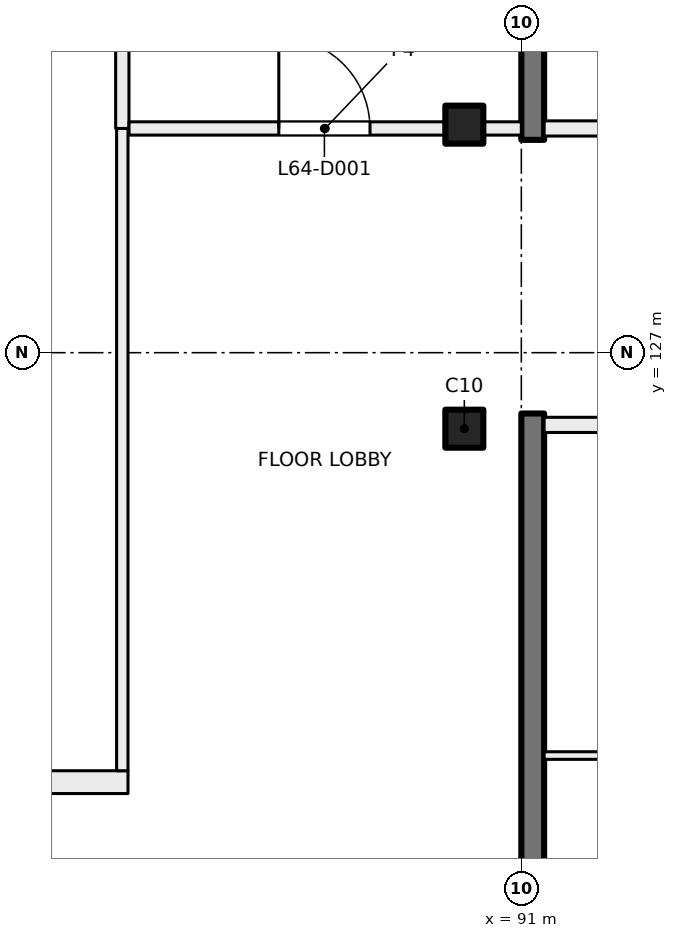
"""IFC4 building model, lengths in metres.
Left out: names, types, materials, properties, quantities, classifications, styles, units other than length and angle.
Written with IfcOpenShell. Run it as: python <this file> out.ifc"""

import sys

from ifc_helpers import new_model, si_unit, direction, frame, frame_2d, origin, origin_2d, place, context, subcontext, project, spatial, rectangle, extrude, element, fill, save


model = new_model("IFC4")
c1 = context("Model", 3, precision=1e-05, world=origin(), true_north=direction((0.0, 1.0)))
c2 = subcontext(c1, "Body", "Model", "MODEL_VIEW")
j1 = project(units=[si_unit("LENGTHUNIT", "METRE"), si_unit("PLANEANGLEUNIT", "RADIAN")], contexts=[c1])
p1 = place(None, origin())
s1 = spatial("IfcSite", under=j1, at=p1, CompositionType="ELEMENT")
p2 = place(p1, origin())
s2 = spatial("IfcBuilding", under=s1, at=p2, CompositionType="ELEMENT")
p3 = place(p2, frame((0.0, 0.0, 269.5)))
s3 = spatial("IfcBuildingStorey", under=s2, at=p3, CompositionType="ELEMENT", Elevation=269.5)
for number, where, z_axis, x_axis in (
    (1, (90.25, 130.0, 0.0), (0.0, 0.0, 1.0), (1.0, 0.0, 0.0)),
    (2, (90.25, 126.0, 0.0), (0.0, 0.0, 1.0), (1.0, 0.0, 0.0)),
):
    element("IfcColumn", number, at=place(p3, frame(where, z_axis=z_axis, x_axis=x_axis)), inside=s3, PredefinedType="COLUMN", context=c2, shape_type="SweptSolid", body=[
        extrude(rectangle(XDim=0.5, YDim=0.5, at=origin_2d()), origin(), (0.0, 0.0, 1.0), 4.0),
    ])
for number, where, z_axis, x_axis in (
    (3, (91.15, 138.55, 0.0), (0.0, 0.0, 1.0), (0.0, -1.0, 0.0)),
    (4, (91.15, 126.2, 0.0), (0.0, 0.0, 1.0), (0.0, -1.0, 0.0)),
):
    element("IfcWall", number, at=place(p3, frame(where, z_axis=z_axis, x_axis=x_axis)), inside=s3, PredefinedType="SHEAR", context=c2, shape_type="SweptSolid", body=[
        extrude(rectangle(XDim=8.75, YDim=0.3, at=frame_2d((4.375, 0.0))), origin(), (0.0, 0.0, 1.0), 4.0),
    ])
p4 = place(p3, frame((95.25, 126.05, 0.0), z_axis=(0.0, 0.0, 1.0), x_axis=(-1.0, 0.0, 0.0)))
e5 = element("IfcWall", 5, at=p4, inside=s3, PredefinedType="PARTITIONING", context=c2, shape_type="SweptSolid", body=[
    extrude(rectangle(XDim=3.95, YDim=0.2, at=frame_2d((1.975, 0.0))), origin(), (0.0, 0.0, 1.0), 3.625),
])
p5 = place(p4, frame((0.3, 0.0, 0.0)))
e6 = element("IfcOpeningElement", 6, at=p5, cuts=e5, PredefinedType="OPENING", context=c2, shape_type="SweptSolid", body=[
    extrude(rectangle(XDim=1.2, YDim=2.1, at=frame_2d((0.6, 1.05))), frame((0.0, 0.11, 0.0), z_axis=(0.0, -1.0, 0.0), x_axis=(1.0, 0.0, 0.0)), (0.0, 0.0, 1.0), 0.22),
])
p6 = place(p3, frame((93.4, 121.7, 0.0), z_axis=(0.0, 0.0, 1.0), x_axis=(-1.0, 0.0, 0.0)))
e7 = element("IfcWall", 7, at=p6, inside=s3, PredefinedType="PARTITIONING", context=c2, shape_type="SweptSolid", body=[
    extrude(rectangle(XDim=2.1, YDim=0.1, at=frame_2d((1.05, 0.0))), origin(), (0.0, 0.0, 1.0), 3.625),
])
p7 = place(p3, frame((91.3, 129.95, 0.0), z_axis=(0.0, 0.0, 1.0), x_axis=(1.0, 0.0, 0.0)))
e8 = element("IfcWall", 8, at=p7, inside=s3, PredefinedType="PARTITIONING", context=c2, shape_type="SweptSolid", body=[
    extrude(rectangle(XDim=3.95, YDim=0.2, at=frame_2d((1.975, 0.0))), origin(), (0.0, 0.0, 1.0), 3.625),
])
p8 = place(p7, frame((2.45, 0.0, 0.0)))
e9 = element("IfcOpeningElement", 9, at=p8, cuts=e8, PredefinedType="OPENING", context=c2, shape_type="SweptSolid", body=[
    extrude(rectangle(XDim=1.2, YDim=2.1, at=frame_2d((0.6, 1.05))), frame((0.0, 0.11, 0.0), z_axis=(0.0, -1.0, 0.0), x_axis=(1.0, 0.0, 0.0)), (0.0, 0.0, 1.0), 0.22),
])
p9 = place(p3, frame((54.4, 121.35, 0.0), z_axis=(0.0, 0.0, 1.0), x_axis=(1.0, 0.0, 0.0)))
e10 = element("IfcWall", 10, at=p9, inside=s3, PredefinedType="PARTITIONING", context=c2, shape_type="SweptSolid", body=[
    extrude(rectangle(XDim=31.425, YDim=0.3, at=frame_2d((15.712, 0.0))), origin(), (0.0, 0.0, 1.0), 3.625),
])
p10 = place(p9, frame((18.95, 0.0, 0.0)))
e11 = element("IfcOpeningElement", 11, at=p10, cuts=e10, PredefinedType="OPENING", context=c2, shape_type="SweptSolid", body=[
    extrude(rectangle(XDim=0.8, YDim=2.1, at=frame_2d((0.4, 1.05))), frame((0.0, 0.16, 0.0), z_axis=(0.0, -1.0, 0.0), x_axis=(1.0, 0.0, 0.0)), (0.0, 0.0, 1.0), 0.32),
])
p11 = place(p9, frame((25.2, 0.0, 0.0)))
e12 = element("IfcOpeningElement", 12, at=p11, cuts=e10, PredefinedType="OPENING", context=c2, shape_type="SweptSolid", body=[
    extrude(rectangle(XDim=1.8, YDim=2.1, at=frame_2d((0.9, 1.05))), frame((0.0, 0.16, 0.0), z_axis=(0.0, -1.0, 0.0), x_axis=(1.0, 0.0, 0.0)), (0.0, 0.0, 1.0), 0.32),
])
p12 = place(p9, frame((12.85, 0.0, 0.0)))
e13 = element("IfcOpeningElement", 13, at=p12, cuts=e10, PredefinedType="OPENING", context=c2, shape_type="SweptSolid", body=[
    extrude(rectangle(XDim=1.0, YDim=2.1, at=frame_2d((0.5, 1.05))), frame((0.0, 0.16, 0.0), z_axis=(0.0, -1.0, 0.0), x_axis=(1.0, 0.0, 0.0)), (0.0, 0.0, 1.0), 0.32),
])
p13 = place(p9, frame((3.515, 0.0, 0.0)))
e14 = element("IfcOpeningElement", 14, at=p13, cuts=e10, PredefinedType="OPENING", context=c2, shape_type="SweptSolid", body=[
    extrude(rectangle(XDim=1.8, YDim=2.1, at=frame_2d((0.9, 1.05))), frame((0.0, 0.16, 0.0), z_axis=(0.0, -1.0, 0.0), x_axis=(1.0, 0.0, 0.0)), (0.0, 0.0, 1.0), 0.32),
])
p14 = place(p3, frame((85.75, 121.5, 0.0), z_axis=(0.0, 0.0, 1.0), x_axis=(0.0, 1.0, 0.0)))
e15 = element("IfcWall", 15, at=p14, inside=s3, PredefinedType="PARTITIONING", context=c2, shape_type="SweptSolid", body=[
    extrude(rectangle(XDim=8.45, YDim=0.15, at=frame_2d((4.225, 0.0))), origin(), (0.0, 0.0, 1.0), 3.625),
])
p15 = place(p3, frame((85.75, 129.95, 0.0), z_axis=(0.0, 0.0, 1.0), x_axis=(0.0, 1.0, 0.0)))
e16 = element("IfcWall", 16, at=p15, inside=s3, PredefinedType="PARTITIONING", context=c2, shape_type="SweptSolid", body=[
    extrude(rectangle(XDim=8.45, YDim=0.175, at=frame_2d((4.225, 0.0))), origin(), (0.0, 0.0, 1.0), 3.625),
])
p16 = place(p3, frame((85.838, 129.95, 0.0), z_axis=(0.0, 0.0, 1.0), x_axis=(1.0, 0.0, 0.0)))
e17 = element("IfcWall", 17, at=p16, inside=s3, PredefinedType="PARTITIONING", context=c2, shape_type="SweptSolid", body=[
    extrude(rectangle(XDim=5.162, YDim=0.175, at=frame_2d((2.581, 0.0))), origin(), (0.0, 0.0, 1.0), 3.625),
])
p17 = place(p16, frame((1.971, 0.0, 0.0)))
e18 = element("IfcOpeningElement", 18, at=p17, cuts=e17, PredefinedType="OPENING", context=c2, shape_type="SweptSolid", body=[
    extrude(rectangle(XDim=1.2, YDim=2.1, at=frame_2d((0.6, 1.05))), frame((0.0, 0.097, 0.0), z_axis=(0.0, -1.0, 0.0), x_axis=(1.0, 0.0, 0.0)), (0.0, 0.0, 1.0), 0.195),
])
p18 = place(p17, origin())
e19 = element("IfcDoor", 19, at=p18, inside=s3, OperationType="DOUBLE_DOOR_SINGLE_SWING", PredefinedType="DOOR", context=c2, shape_type="SweptSolid", body=[
    extrude(rectangle(XDim=1.2, YDim=2.1, at=frame_2d((0.6, 1.05))), frame((0.0, 0.025, 0.0), z_axis=(0.0, -1.0, 0.0), x_axis=(1.0, 0.0, 0.0)), (0.0, 0.0, 1.0), 0.05),
])
fill(e18, e19)
save(model, sys.argv[1])
